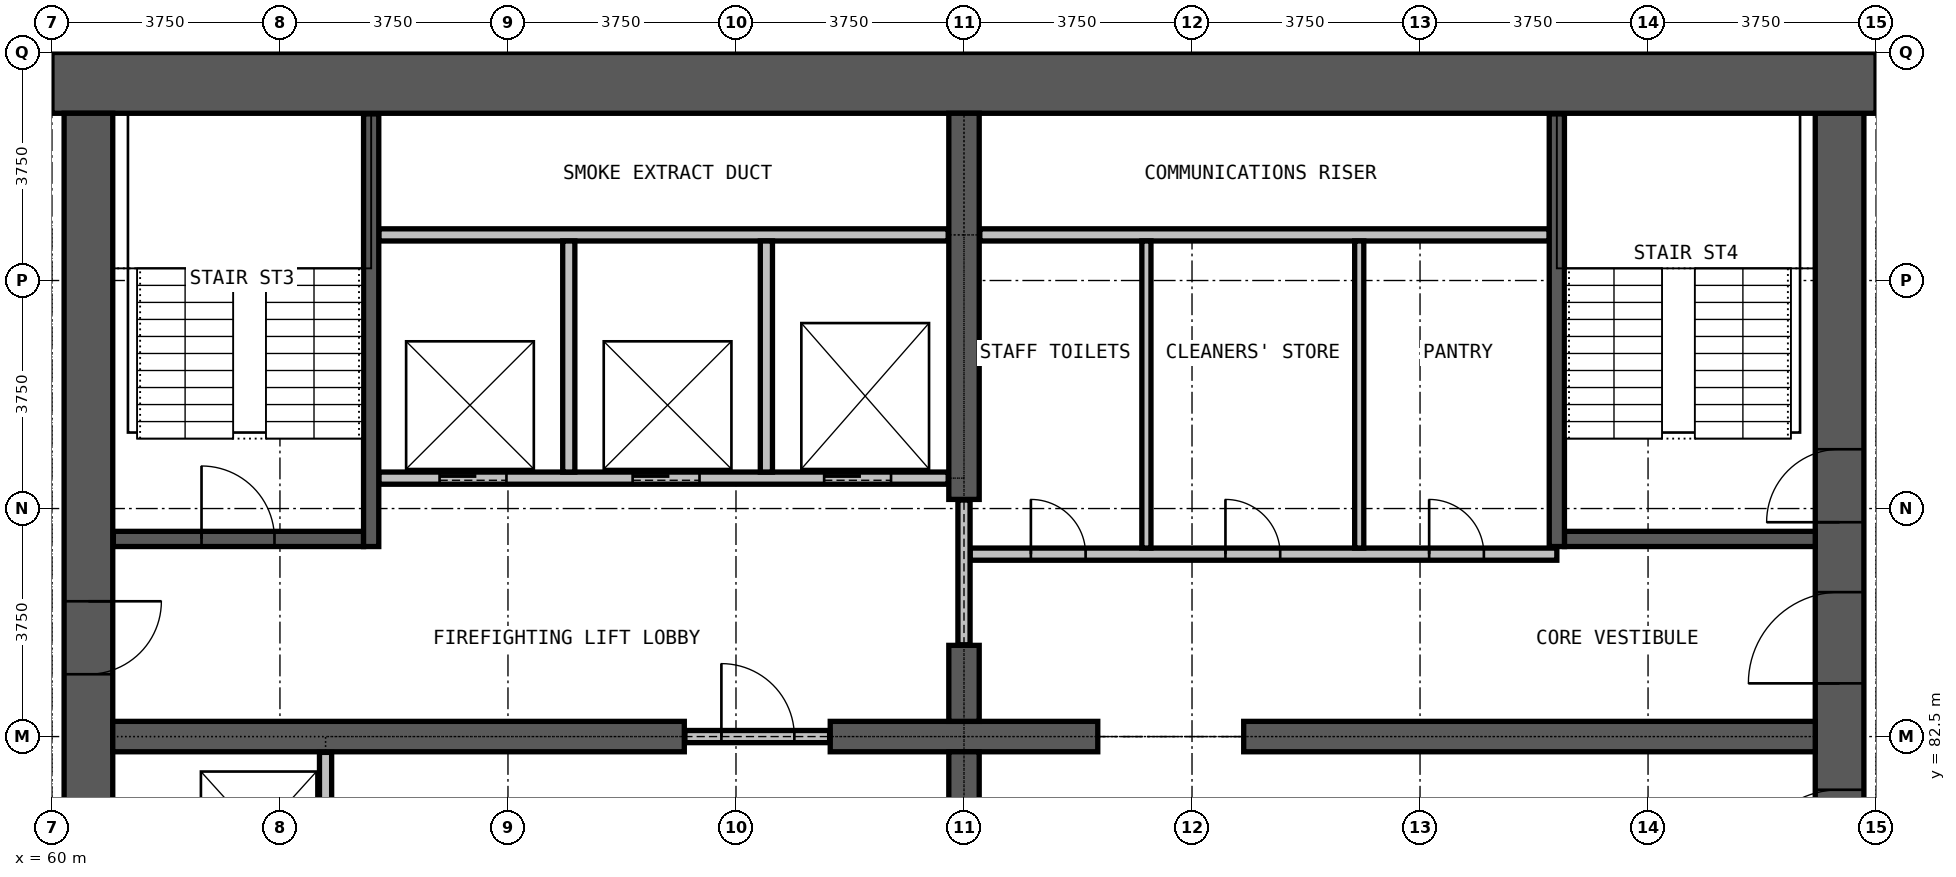
"""IFC4 building model, lengths in metres.
Left out: names, types, materials, properties, quantities, classifications, styles, units other than length and angle.
Written with IfcOpenShell. Run it as: python <this file> out.ifc"""

import sys

from ifc_helpers import new_model, si_unit, direction, frame, frame_2d, origin, place, context, subcontext, project, spatial, rectangle, extrude, element, fill, save


model = new_model("IFC4")
c1 = context("Model", 3, precision=1e-05, world=origin(), true_north=direction((0.0, 1.0)))
c2 = subcontext(c1, "Body", "Model", "MODEL_VIEW")
j1 = project(units=[si_unit("LENGTHUNIT", "METRE"), si_unit("PLANEANGLEUNIT", "RADIAN")], contexts=[c1])
p1 = place(None, origin())
s1 = spatial("IfcSite", under=j1, at=p1, CompositionType="ELEMENT")
p2 = place(p1, origin())
s2 = spatial("IfcBuilding", under=s1, at=p2, CompositionType="ELEMENT")
p3 = place(p2, frame((0.0, 0.0, 132.4)))
s3 = spatial("IfcBuildingStorey", under=s2, at=p3, CompositionType="ELEMENT", Elevation=132.4)
p4 = place(p3, frame((89.4, 72.25, 0.0), z_axis=(0.0, 0.0, 1.0), x_axis=(0.0, 1.0, 0.0)))
e1 = element("IfcWall", 1, at=p4, inside=s3, PredefinedType="SHEAR", context=c2, shape_type="SweptSolid", body=[
    extrude(rectangle(XDim=20.5, YDim=0.8, at=frame_2d((10.25, 0.0))), origin(), (0.0, 0.0, 1.0), 3.6),
])
p5 = place(p4, frame((0.275, 0.0, 0.0)))
e2 = element("IfcOpeningElement", 2, at=p5, cuts=e1, PredefinedType="OPENING", context=c2, shape_type="SweptSolid", body=[
    extrude(rectangle(XDim=1.2, YDim=2.2, at=frame_2d((0.6, 1.1))), frame((0.0, 0.41, 0.0), z_axis=(0.0, -1.0, 0.0), x_axis=(1.0, 0.0, 0.0)), (0.0, 0.0, 1.0), 0.82),
])
p6 = place(p4, frame((13.775, 0.0, 0.0)))
e3 = element("IfcOpeningElement", 3, at=p6, cuts=e1, PredefinedType="OPENING", context=c2, shape_type="SweptSolid", body=[
    extrude(rectangle(XDim=1.2, YDim=2.2, at=frame_2d((0.6, 1.1))), frame((0.0, 0.41, 0.0), z_axis=(0.0, -1.0, 0.0), x_axis=(1.0, 0.0, 0.0)), (0.0, 0.0, 1.0), 0.82),
])
p7 = place(p4, frame((7.875, 0.0, 0.0)))
e4 = element("IfcOpeningElement", 4, at=p7, cuts=e1, PredefinedType="OPENING", context=c2, shape_type="SweptSolid", body=[
    extrude(rectangle(XDim=1.5, YDim=2.2, at=frame_2d((0.75, 1.1))), frame((0.0, 0.41, 0.0), z_axis=(0.0, -1.0, 0.0), x_axis=(1.0, 0.0, 0.0)), (0.0, 0.0, 1.0), 0.82),
])
p8 = place(p4, frame((11.125, 0.0, 0.0)))
e5 = element("IfcOpeningElement", 5, at=p8, cuts=e1, PredefinedType="OPENING", context=c2, shape_type="SweptSolid", body=[
    extrude(rectangle(XDim=1.5, YDim=2.2, at=frame_2d((0.75, 1.1))), frame((0.0, 0.41, 0.0), z_axis=(0.0, -1.0, 0.0), x_axis=(1.0, 0.0, 0.0)), (0.0, 0.0, 1.0), 0.82),
])
p9 = place(p3, frame((90.0, 93.25, 0.0), z_axis=(0.0, 0.0, 1.0), x_axis=(-1.0, 0.0, 0.0)))
e6 = element("IfcWall", 6, at=p9, inside=s3, PredefinedType="SHEAR", context=c2, shape_type="SweptSolid", body=[
    extrude(rectangle(XDim=30.0, YDim=1.0, at=frame_2d((15.0, 0.0))), origin(), (0.0, 0.0, 1.0), 3.6),
])
p10 = place(p3, frame((60.6, 92.75, 0.0), z_axis=(0.0, 0.0, 1.0), x_axis=(0.0, -1.0, 0.0)))
e7 = element("IfcWall", 7, at=p10, inside=s3, PredefinedType="SHEAR", context=c2, shape_type="SweptSolid", body=[
    extrude(rectangle(XDim=20.5, YDim=0.8, at=frame_2d((10.25, 0.0))), origin(), (0.0, 0.0, 1.0), 3.6),
])
p11 = place(p10, frame((19.025, 0.0, 0.0)))
e8 = element("IfcOpeningElement", 8, at=p11, cuts=e7, PredefinedType="OPENING", context=c2, shape_type="SweptSolid", body=[
    extrude(rectangle(XDim=1.2, YDim=2.2, at=frame_2d((0.6, 1.1))), frame((0.0, 0.41, 0.0), z_axis=(0.0, -1.0, 0.0), x_axis=(1.0, 0.0, 0.0)), (0.0, 0.0, 1.0), 0.82),
])
p12 = place(p10, frame((8.025, 0.0, 0.0)))
e9 = element("IfcOpeningElement", 9, at=p12, cuts=e7, PredefinedType="OPENING", context=c2, shape_type="SweptSolid", body=[
    extrude(rectangle(XDim=1.2, YDim=2.2, at=frame_2d((0.6, 1.1))), frame((0.0, 0.41, 0.0), z_axis=(0.0, -1.0, 0.0), x_axis=(1.0, 0.0, 0.0)), (0.0, 0.0, 1.0), 0.82),
])
p13 = place(p3, frame((61.0, 82.5, 0.0), z_axis=(0.0, 0.0, 1.0), x_axis=(1.0, 0.0, 0.0)))
e10 = element("IfcWall", 10, at=p13, inside=s3, PredefinedType="SHEAR", context=c2, shape_type="SweptSolid", body=[
    extrude(rectangle(XDim=9.4, YDim=0.5, at=frame_2d((4.7, 0.0))), origin(), (0.0, 0.0, 1.0), 3.6),
])
p14 = place(p3, frame((72.8, 82.5, 0.0), z_axis=(0.0, 0.0, 1.0), x_axis=(1.0, 0.0, 0.0)))
e11 = element("IfcWall", 11, at=p14, inside=s3, PredefinedType="SHEAR", context=c2, shape_type="SweptSolid", body=[
    extrude(rectangle(XDim=4.4, YDim=0.5, at=frame_2d((2.2, 0.0))), origin(), (0.0, 0.0, 1.0), 3.6),
])
p15 = place(p3, frame((79.6, 82.5, 0.0), z_axis=(0.0, 0.0, 1.0), x_axis=(1.0, 0.0, 0.0)))
e12 = element("IfcWall", 12, at=p15, inside=s3, PredefinedType="SHEAR", context=c2, shape_type="SweptSolid", body=[
    extrude(rectangle(XDim=9.4, YDim=0.5, at=frame_2d((4.7, 0.0))), origin(), (0.0, 0.0, 1.0), 3.6),
])
for number, where, z_axis, x_axis in (
    (13, (75.0, 81.0, 0.0), (0.0, 0.0, 1.0), (0.0, 1.0, 0.0)),
    (14, (75.0, 82.75, 0.0), (0.0, 0.0, 1.0), (0.0, 1.0, 0.0)),
):
    element("IfcWall", number, at=place(p3, frame(where, z_axis=z_axis, x_axis=x_axis)), inside=s3, PredefinedType="SHEAR", context=c2, shape_type="SweptSolid", body=[
        extrude(rectangle(XDim=1.25, YDim=0.5, at=frame_2d((0.625, 0.0))), origin(), (0.0, 0.0, 1.0), 3.6),
    ])
p16 = place(p3, frame((75.0, 86.4, 0.0), z_axis=(0.0, 0.0, 1.0), x_axis=(0.0, 1.0, 0.0)))
e15 = element("IfcWall", 15, at=p16, inside=s3, PredefinedType="SHEAR", context=c2, shape_type="SweptSolid", body=[
    extrude(rectangle(XDim=6.35, YDim=0.5, at=frame_2d((3.175, 0.0))), origin(), (0.0, 0.0, 1.0), 3.6),
])
p17 = place(p3, frame((70.41, 82.5, 0.0), z_axis=(0.0, 0.0, 1.0), x_axis=(1.0, 0.0, 0.0)))
e16 = element("IfcWall", 16, at=p17, inside=s3, PredefinedType="PARTITIONING", context=c2, shape_type="SweptSolid", body=[
    extrude(rectangle(XDim=2.38, YDim=0.2, at=frame_2d((1.19, 0.0))), origin(), (0.0, 0.0, 1.0), 2.4),
])
p18 = place(p17, frame((0.6, 0.0, 0.0)))
e17 = element("IfcOpeningElement", 17, at=p18, cuts=e16, PredefinedType="OPENING", context=c2, shape_type="SweptSolid", body=[
    extrude(rectangle(XDim=1.2, YDim=2.2, at=frame_2d((0.6, 1.1))), frame((0.0, 0.11, 0.0), z_axis=(0.0, -1.0, 0.0), x_axis=(1.0, 0.0, 0.0)), (0.0, 0.0, 1.0), 0.22),
])
p19 = place(p3, frame((75.1, 85.5, 0.0), z_axis=(0.0, 0.0, 1.0), x_axis=(1.0, 0.0, 0.0)))
e18 = element("IfcWall", 18, at=p19, inside=s3, PredefinedType="PARTITIONING", context=c2, shape_type="SweptSolid", body=[
    extrude(rectangle(XDim=9.65, YDim=0.2, at=frame_2d((4.825, 0.0))), origin(), (0.0, 0.0, 1.0), 3.3),
])
p20 = place(p19, frame((1.0, 0.0, 0.0)))
e19 = element("IfcOpeningElement", 19, at=p20, cuts=e18, PredefinedType="OPENING", context=c2, shape_type="SweptSolid", body=[
    extrude(rectangle(XDim=0.9, YDim=2.2, at=frame_2d((0.45, 1.1))), frame((0.0, 0.11, 0.0), z_axis=(0.0, -1.0, 0.0), x_axis=(1.0, 0.0, 0.0)), (0.0, 0.0, 1.0), 0.22),
])
p21 = place(p19, frame((4.2, 0.0, 0.0)))
e20 = element("IfcOpeningElement", 20, at=p21, cuts=e18, PredefinedType="OPENING", context=c2, shape_type="SweptSolid", body=[
    extrude(rectangle(XDim=0.9, YDim=2.2, at=frame_2d((0.45, 1.1))), frame((0.0, 0.11, 0.0), z_axis=(0.0, -1.0, 0.0), x_axis=(1.0, 0.0, 0.0)), (0.0, 0.0, 1.0), 0.22),
])
p22 = place(p19, frame((7.55, 0.0, 0.0)))
e21 = element("IfcOpeningElement", 21, at=p22, cuts=e18, PredefinedType="OPENING", context=c2, shape_type="SweptSolid", body=[
    extrude(rectangle(XDim=0.9, YDim=2.2, at=frame_2d((0.45, 1.1))), frame((0.0, 0.11, 0.0), z_axis=(0.0, -1.0, 0.0), x_axis=(1.0, 0.0, 0.0)), (0.0, 0.0, 1.0), 0.22),
])
p23 = place(p3, frame((75.26, 90.75, 0.0), z_axis=(0.0, 0.0, 1.0), x_axis=(1.0, 0.0, 0.0)))
e22 = element("IfcWall", 22, at=p23, inside=s3, PredefinedType="PARTITIONING", context=c2, shape_type="SweptSolid", body=[
    extrude(rectangle(XDim=9.365, YDim=0.2, at=frame_2d((4.683, 0.0))), origin(), (0.0, 0.0, 1.0), 3.3),
])
p24 = place(p3, frame((75.0, 84.01, 0.0), z_axis=(0.0, 0.0, 1.0), x_axis=(0.0, 1.0, 0.0)))
e23 = element("IfcWall", 23, at=p24, inside=s3, PredefinedType="PARTITIONING", context=c2, shape_type="SweptSolid", body=[
    extrude(rectangle(XDim=2.38, YDim=0.2, at=frame_2d((1.19, 0.0))), origin(), (0.0, 0.0, 1.0), 2.4),
])
for number, where, z_axis, x_axis in (
    (24, (78.0, 85.6, 0.0), (0.0, 0.0, 1.0), (0.0, 1.0, 0.0)),
    (25, (81.5, 85.6, 0.0), (0.0, 0.0, 1.0), (0.0, 1.0, 0.0)),
):
    element("IfcWall", number, at=place(p3, frame(where, z_axis=z_axis, x_axis=x_axis)), inside=s3, PredefinedType="PARTITIONING", context=c2, shape_type="SweptSolid", body=[
        extrude(rectangle(XDim=5.05, YDim=0.15, at=frame_2d((2.525, 0.0))), origin(), (0.0, 0.0, 1.0), 3.3),
    ])
p25 = place(p3, frame((65.375, 86.75, 0.0), z_axis=(0.0, 0.0, 1.0), x_axis=(1.0, 0.0, 0.0)))
e26 = element("IfcWall", 26, at=p25, inside=s3, PredefinedType="PARTITIONING", context=c2, shape_type="SweptSolid", body=[
    extrude(rectangle(XDim=9.365, YDim=0.2, at=frame_2d((4.683, 0.0))), origin(), (0.0, 0.0, 1.0), 3.3),
])
p26 = place(p25, frame((1.0, 0.0, 0.0)))
e27 = element("IfcOpeningElement", 27, at=p26, cuts=e26, PredefinedType="OPENING", context=c2, shape_type="SweptSolid", body=[
    extrude(rectangle(XDim=1.1, YDim=2.2, at=frame_2d((0.55, 1.1))), frame((0.0, 0.11, 0.0), z_axis=(0.0, -1.0, 0.0), x_axis=(1.0, 0.0, 0.0)), (0.0, 0.0, 1.0), 0.22),
])
p27 = place(p25, frame((4.175, 0.0, 0.0)))
e28 = element("IfcOpeningElement", 28, at=p27, cuts=e26, PredefinedType="OPENING", context=c2, shape_type="SweptSolid", body=[
    extrude(rectangle(XDim=1.1, YDim=2.2, at=frame_2d((0.55, 1.1))), frame((0.0, 0.11, 0.0), z_axis=(0.0, -1.0, 0.0), x_axis=(1.0, 0.0, 0.0)), (0.0, 0.0, 1.0), 0.22),
])
p28 = place(p25, frame((7.325, 0.0, 0.0)))
e29 = element("IfcOpeningElement", 29, at=p28, cuts=e26, PredefinedType="OPENING", context=c2, shape_type="SweptSolid", body=[
    extrude(rectangle(XDim=1.1, YDim=2.2, at=frame_2d((0.55, 1.1))), frame((0.0, 0.11, 0.0), z_axis=(0.0, -1.0, 0.0), x_axis=(1.0, 0.0, 0.0)), (0.0, 0.0, 1.0), 0.22),
])
p29 = place(p3, frame((65.375, 90.75, 0.0), z_axis=(0.0, 0.0, 1.0), x_axis=(1.0, 0.0, 0.0)))
e30 = element("IfcWall", 30, at=p29, inside=s3, PredefinedType="PARTITIONING", context=c2, shape_type="SweptSolid", body=[
    extrude(rectangle(XDim=9.365, YDim=0.2, at=frame_2d((4.683, 0.0))), origin(), (0.0, 0.0, 1.0), 3.3),
])
p30 = place(p3, frame((64.5, 79.375, 0.0), z_axis=(0.0, 0.0, 1.0), x_axis=(0.0, 1.0, 0.0)))
e31 = element("IfcWall", 31, at=p30, inside=s3, PredefinedType="PARTITIONING", context=c2, shape_type="SweptSolid", body=[
    extrude(rectangle(XDim=2.865, YDim=0.2, at=frame_2d((1.433, 0.0))), origin(), (0.0, 0.0, 1.0), 3.3),
])
for number, where, z_axis, x_axis in (
    (32, (68.5, 86.85, 0.0), (0.0, 0.0, 1.0), (0.0, 1.0, 0.0)),
    (33, (71.75, 86.85, 0.0), (0.0, 0.0, 1.0), (0.0, 1.0, 0.0)),
):
    element("IfcWall", number, at=place(p3, frame(where, z_axis=z_axis, x_axis=x_axis)), inside=s3, PredefinedType="PARTITIONING", context=c2, shape_type="SweptSolid", body=[
        extrude(rectangle(XDim=3.8, YDim=0.2, at=frame_2d((1.9, 0.0))), origin(), (0.0, 0.0, 1.0), 3.3),
    ])
p31 = place(p3, frame((61.01, 85.75, 0.0), z_axis=(0.0, 0.0, 1.0), x_axis=(1.0, 0.0, 0.0)))
e34 = element("IfcWall", 34, at=p31, inside=s3, PredefinedType="PARTITIONING", context=c2, shape_type="SweptSolid", body=[
    extrude(rectangle(XDim=4.115, YDim=0.25, at=frame_2d((2.058, 0.0))), origin(), (0.0, 0.0, 1.0), 3.3),
])
p32 = place(p31, frame((1.45, 0.0, 0.0)))
e35 = element("IfcOpeningElement", 35, at=p32, cuts=e34, PredefinedType="OPENING", context=c2, shape_type="SweptSolid", body=[
    extrude(rectangle(XDim=1.2, YDim=2.2, at=frame_2d((0.6, 1.1))), frame((0.0, 0.135, 0.0), z_axis=(0.0, -1.0, 0.0), x_axis=(1.0, 0.0, 0.0)), (0.0, 0.0, 1.0), 0.27),
])
p33 = place(p3, frame((84.875, 85.75, 0.0), z_axis=(0.0, 0.0, 1.0), x_axis=(1.0, 0.0, 0.0)))
e36 = element("IfcWall", 36, at=p33, inside=s3, PredefinedType="PARTITIONING", context=c2, shape_type="SweptSolid", body=[
    extrude(rectangle(XDim=4.125, YDim=0.25, at=frame_2d((2.062, 0.0))), origin(), (0.0, 0.0, 1.0), 3.3),
])
for number, where, z_axis, x_axis in (
    (37, (65.25, 85.625, 0.0), (0.0, 0.0, 1.0), (0.0, 1.0, 0.0)),
    (38, (84.75, 85.625, 0.0), (0.0, 0.0, 1.0), (0.0, 1.0, 0.0)),
):
    element("IfcWall", number, at=place(p3, frame(where, z_axis=z_axis, x_axis=x_axis)), inside=s3, PredefinedType="PARTITIONING", context=c2, shape_type="SweptSolid", body=[
        extrude(rectangle(XDim=7.115, YDim=0.25, at=frame_2d((3.558, 0.0))), origin(), (0.0, 0.0, 1.0), 3.3),
    ])
p34 = place(p26, origin())
e39 = element("IfcDoor", 39, at=p34, inside=s3, OperationType="DOUBLE_DOOR_SLIDING", PredefinedType="DOOR", context=c2, shape_type="SweptSolid", body=[
    extrude(rectangle(XDim=1.1, YDim=2.2, at=frame_2d((0.55, 1.1))), frame((0.0, 0.025, 0.0), z_axis=(0.0, -1.0, 0.0), x_axis=(1.0, 0.0, 0.0)), (0.0, 0.0, 1.0), 0.05),
])
fill(e27, e39)
p35 = place(p27, origin())
e40 = element("IfcDoor", 40, at=p35, inside=s3, OperationType="DOUBLE_DOOR_SLIDING", PredefinedType="DOOR", context=c2, shape_type="SweptSolid", body=[
    extrude(rectangle(XDim=1.1, YDim=2.2, at=frame_2d((0.55, 1.1))), frame((0.0, 0.025, 0.0), z_axis=(0.0, -1.0, 0.0), x_axis=(1.0, 0.0, 0.0)), (0.0, 0.0, 1.0), 0.05),
])
fill(e28, e40)
p36 = place(p28, origin())
e41 = element("IfcDoor", 41, at=p36, inside=s3, OperationType="DOUBLE_DOOR_SLIDING", PredefinedType="DOOR", context=c2, shape_type="SweptSolid", body=[
    extrude(rectangle(XDim=1.1, YDim=2.2, at=frame_2d((0.55, 1.1))), frame((0.0, 0.025, 0.0), z_axis=(0.0, -1.0, 0.0), x_axis=(1.0, 0.0, 0.0)), (0.0, 0.0, 1.0), 0.05),
])
fill(e29, e41)
p37 = place(p18, origin())
e42 = element("IfcDoor", 42, at=p37, inside=s3, OperationType="SINGLE_SWING_RIGHT", PredefinedType="DOOR", context=c2, shape_type="SweptSolid", body=[
    extrude(rectangle(XDim=1.2, YDim=2.2, at=frame_2d((0.6, 1.1))), frame((0.0, 0.025, 0.0), z_axis=(0.0, -1.0, 0.0), x_axis=(1.0, 0.0, 0.0)), (0.0, 0.0, 1.0), 0.05),
])
fill(e17, e42)
p38 = place(p32, origin())
e43 = element("IfcDoor", 43, at=p38, inside=s3, OperationType="SINGLE_SWING_LEFT", PredefinedType="DOOR", context=c2, shape_type="SweptSolid", body=[
    extrude(rectangle(XDim=1.2, YDim=2.2, at=frame_2d((0.6, 1.1))), frame((0.0, 0.025, 0.0), z_axis=(0.0, -1.0, 0.0), x_axis=(1.0, 0.0, 0.0)), (0.0, 0.0, 1.0), 0.05),
])
fill(e35, e43)
p39 = place(p6, origin())
e44 = element("IfcDoor", 44, at=p39, inside=s3, OperationType="SINGLE_SWING_LEFT", PredefinedType="DOOR", context=c2, shape_type="SweptSolid", body=[
    extrude(rectangle(XDim=1.2, YDim=2.2, at=frame_2d((0.6, 1.1))), frame((0.0, 0.025, 0.0), z_axis=(0.0, -1.0, 0.0), x_axis=(1.0, 0.0, 0.0)), (0.0, 0.0, 1.0), 0.05),
])
fill(e3, e44)
p40 = place(p7, origin())
e45 = element("IfcDoor", 45, at=p40, inside=s3, OperationType="DOUBLE_DOOR_SINGLE_SWING", PredefinedType="DOOR", context=c2, shape_type="SweptSolid", body=[
    extrude(rectangle(XDim=1.5, YDim=2.2, at=frame_2d((0.75, 1.1))), frame((0.0, 0.025, 0.0), z_axis=(0.0, -1.0, 0.0), x_axis=(1.0, 0.0, 0.0)), (0.0, 0.0, 1.0), 0.05),
])
fill(e4, e45)
p41 = place(p12, origin())
e46 = element("IfcDoor", 46, at=p41, inside=s3, OperationType="SINGLE_SWING_LEFT", PredefinedType="DOOR", context=c2, shape_type="SweptSolid", body=[
    extrude(rectangle(XDim=1.2, YDim=2.2, at=frame_2d((0.6, 1.1))), frame((0.0, 0.025, 0.0), z_axis=(0.0, -1.0, 0.0), x_axis=(1.0, 0.0, 0.0)), (0.0, 0.0, 1.0), 0.05),
])
fill(e9, e46)
p42 = place(p8, origin())
e47 = element("IfcDoor", 47, at=p42, inside=s3, OperationType="DOUBLE_DOOR_SINGLE_SWING", PredefinedType="DOOR", context=c2, shape_type="SweptSolid", body=[
    extrude(rectangle(XDim=1.5, YDim=2.2, at=frame_2d((0.75, 1.1))), frame((0.0, 0.025, 0.0), z_axis=(0.0, -1.0, 0.0), x_axis=(1.0, 0.0, 0.0)), (0.0, 0.0, 1.0), 0.05),
])
fill(e5, e47)
p43 = place(p20, origin())
e48 = element("IfcDoor", 48, at=p43, inside=s3, OperationType="SINGLE_SWING_RIGHT", PredefinedType="DOOR", context=c2, shape_type="SweptSolid", body=[
    extrude(rectangle(XDim=0.9, YDim=2.2, at=frame_2d((0.45, 1.1))), frame((0.0, 0.025, 0.0), z_axis=(0.0, -1.0, 0.0), x_axis=(1.0, 0.0, 0.0)), (0.0, 0.0, 1.0), 0.05),
])
fill(e19, e48)
p44 = place(p21, origin())
e49 = element("IfcDoor", 49, at=p44, inside=s3, OperationType="SINGLE_SWING_RIGHT", PredefinedType="DOOR", context=c2, shape_type="SweptSolid", body=[
    extrude(rectangle(XDim=0.9, YDim=2.2, at=frame_2d((0.45, 1.1))), frame((0.0, 0.025, 0.0), z_axis=(0.0, -1.0, 0.0), x_axis=(1.0, 0.0, 0.0)), (0.0, 0.0, 1.0), 0.05),
])
fill(e20, e49)
p45 = place(p22, origin())
e50 = element("IfcDoor", 50, at=p45, inside=s3, OperationType="SINGLE_SWING_LEFT", PredefinedType="DOOR", context=c2, shape_type="SweptSolid", body=[
    extrude(rectangle(XDim=0.9, YDim=2.2, at=frame_2d((0.45, 1.1))), frame((0.0, 0.025, 0.0), z_axis=(0.0, -1.0, 0.0), x_axis=(1.0, 0.0, 0.0)), (0.0, 0.0, 1.0), 0.05),
])
fill(e21, e50)
save(model, sys.argv[1])
